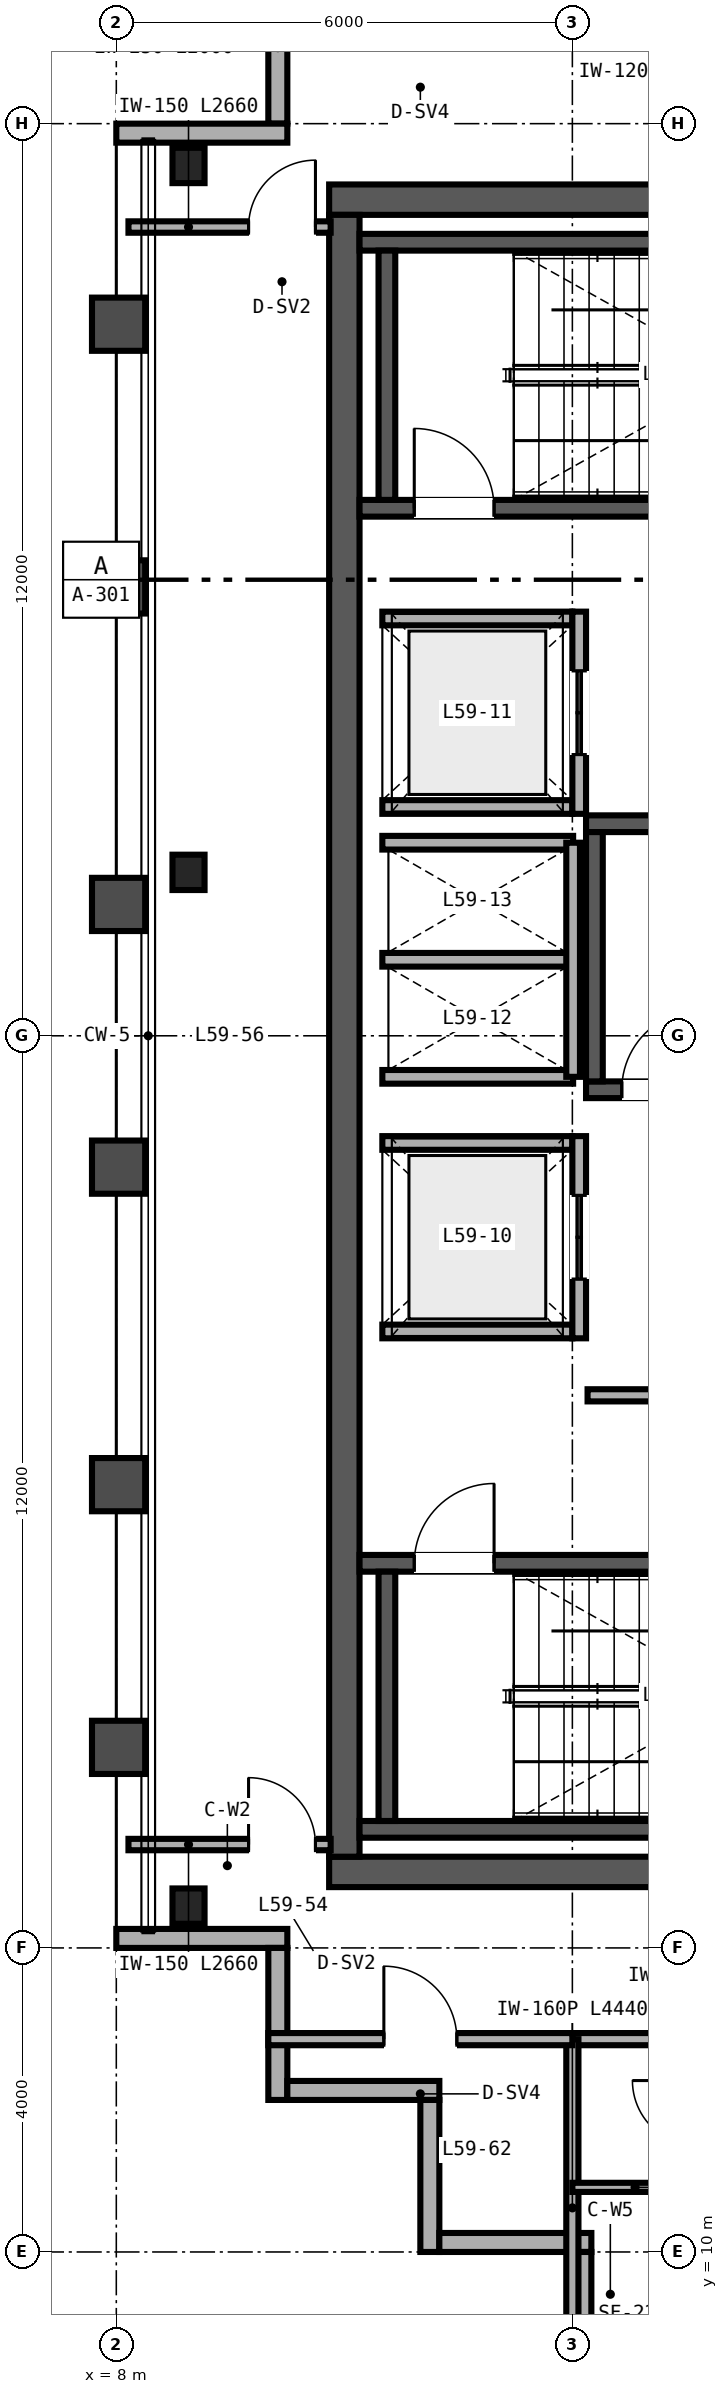
"""IFC4 building model, lengths in metres.
Left out: names, types, materials, properties, quantities, classifications, styles, units other than length and angle.
Written with IfcOpenShell. Run it as: python <this file> out.ifc"""

import sys

from ifc_helpers import new_model, si_unit, direction, frame, frame_2d, origin, origin_2d, place, context, subcontext, project, spatial, rectangle, i_section, extrude, source, transform, mapped, element, fill, save


model = new_model("IFC4")
c1 = context("Model", 3, precision=1e-05, world=origin(), true_north=direction((0.0, 1.0)))
c2 = subcontext(c1, "Body", "Model", "MODEL_VIEW")
j1 = project(units=[si_unit("LENGTHUNIT", "METRE"), si_unit("PLANEANGLEUNIT", "RADIAN")], contexts=[c1])
p1 = place(None, origin())
s1 = spatial("IfcSite", under=j1, at=p1, CompositionType="ELEMENT")
p2 = place(p1, origin())
s2 = spatial("IfcBuilding", under=s1, at=p2, CompositionType="ELEMENT")
p3 = place(p2, frame((0.0, 0.0, 236.4)))
s3 = spatial("IfcBuildingStorey", under=s2, at=p3, CompositionType="ELEMENT", Elevation=236.4)
p4 = place(p3, frame((10.8, 15.0, 0.0), z_axis=(0.0, 0.0, 1.0), x_axis=(1.0, 0.0, 0.0)))
e1 = element("IfcWall", 1, at=p4, inside=s3, PredefinedType="SHEAR", context=c2, shape_type="SweptSolid", body=[
    extrude(rectangle(XDim=12.4, YDim=0.4, at=frame_2d((6.2, 0.0))), origin(), (0.0, 0.0, 1.0), 3.38),
])
p5 = place(p4, frame((10.1, 0.0, 0.0)))
e2 = element("IfcOpeningElement", 2, at=p5, cuts=e1, PredefinedType="OPENING", context=c2, shape_type="SweptSolid", body=[
    extrude(rectangle(XDim=1.0, YDim=2.15, at=frame_2d((0.5, 1.075))), frame((0.0, 0.21, 0.0), z_axis=(0.0, -1.0, 0.0), x_axis=(1.0, 0.0, 0.0)), (0.0, 0.0, 1.0), 0.42),
])
p6 = place(p3, frame((10.8, 37.0, 0.0), z_axis=(0.0, 0.0, 1.0), x_axis=(1.0, 0.0, 0.0)))
e3 = element("IfcWall", 3, at=p6, inside=s3, PredefinedType="SHEAR", context=c2, shape_type="SweptSolid", body=[
    extrude(rectangle(XDim=12.4, YDim=0.4, at=frame_2d((6.2, 0.0))), origin(), (0.0, 0.0, 1.0), 3.38),
])
p7 = place(p6, frame((8.78, 0.0, 0.0)))
e4 = element("IfcOpeningElement", 4, at=p7, cuts=e3, PredefinedType="OPENING", context=c2, shape_type="SweptSolid", body=[
    extrude(rectangle(XDim=1.0, YDim=2.15, at=frame_2d((0.5, 1.075))), frame((0.0, 0.21, 0.0), z_axis=(0.0, -1.0, 0.0), x_axis=(1.0, 0.0, 0.0)), (0.0, 0.0, 1.0), 0.42),
])
p8 = place(p3, frame((11.0, 15.2, 0.0), z_axis=(0.0, 0.0, 1.0), x_axis=(0.0, 1.0, 0.0)))
e5 = element("IfcWall", 5, at=p8, inside=s3, PredefinedType="SHEAR", context=c2, shape_type="SweptSolid", body=[
    extrude(rectangle(XDim=21.6, YDim=0.4, at=frame_2d((10.8, 0.0))), origin(), (0.0, 0.0, 1.0), 3.38),
])
p9 = place(p3, frame((11.2, 15.56, 0.0), z_axis=(0.0, 0.0, 1.0), x_axis=(1.0, 0.0, 0.0)))
e6 = element("IfcWall", 6, at=p9, inside=s3, PredefinedType="SHEAR", context=c2, shape_type="SweptSolid", body=[
    extrude(rectangle(XDim=8.11, YDim=0.22, at=frame_2d((4.055, 0.0))), origin(), (0.0, 0.0, 1.0), 3.4),
])
p10 = place(p3, frame((11.2, 19.06, 0.0), z_axis=(0.0, 0.0, 1.0), x_axis=(1.0, 0.0, 0.0)))
e7 = element("IfcWall", 7, at=p10, inside=s3, PredefinedType="SHEAR", context=c2, shape_type="SweptSolid", body=[
    extrude(rectangle(XDim=8.11, YDim=0.22, at=frame_2d((4.055, 0.0))), origin(), (0.0, 0.0, 1.0), 3.4),
])
p11 = place(p10, frame((0.72, 0.0, 0.0)))
e8 = element("IfcOpeningElement", 8, at=p11, cuts=e7, PredefinedType="OPENING", context=c2, shape_type="SweptSolid", body=[
    extrude(rectangle(XDim=1.05, YDim=2.15, at=frame_2d((0.525, 1.075))), frame((0.0, 0.12, 0.0), z_axis=(0.0, -1.0, 0.0), x_axis=(1.0, 0.0, 0.0)), (0.0, 0.0, 1.0), 0.24),
])
p12 = place(p3, frame((11.56, 15.67, 0.0), z_axis=(0.0, 0.0, 1.0), x_axis=(0.0, 1.0, 0.0)))
e9 = element("IfcWall", 9, at=p12, inside=s3, PredefinedType="SHEAR", context=c2, shape_type="SweptSolid", body=[
    extrude(rectangle(XDim=3.28, YDim=0.22, at=frame_2d((1.64, 0.0))), origin(), (0.0, 0.0, 1.0), 3.4),
])
p13 = place(p3, frame((11.2, 32.94, 0.0), z_axis=(0.0, 0.0, 1.0), x_axis=(1.0, 0.0, 0.0)))
e10 = element("IfcWall", 10, at=p13, inside=s3, PredefinedType="SHEAR", context=c2, shape_type="SweptSolid", body=[
    extrude(rectangle(XDim=8.11, YDim=0.22, at=frame_2d((4.055, 0.0))), origin(), (0.0, 0.0, 1.0), 3.4),
])
p14 = place(p13, frame((0.72, 0.0, 0.0)))
e11 = element("IfcOpeningElement", 11, at=p14, cuts=e10, PredefinedType="OPENING", context=c2, shape_type="SweptSolid", body=[
    extrude(rectangle(XDim=1.05, YDim=2.15, at=frame_2d((0.525, 1.075))), frame((0.0, 0.12, 0.0), z_axis=(0.0, -1.0, 0.0), x_axis=(1.0, 0.0, 0.0)), (0.0, 0.0, 1.0), 0.24),
])
p15 = place(p3, frame((11.2, 36.44, 0.0), z_axis=(0.0, 0.0, 1.0), x_axis=(1.0, 0.0, 0.0)))
e12 = element("IfcWall", 12, at=p15, inside=s3, PredefinedType="SHEAR", context=c2, shape_type="SweptSolid", body=[
    extrude(rectangle(XDim=8.11, YDim=0.22, at=frame_2d((4.055, 0.0))), origin(), (0.0, 0.0, 1.0), 3.4),
])
p16 = place(p3, frame((11.56, 33.05, 0.0), z_axis=(0.0, 0.0, 1.0), x_axis=(0.0, 1.0, 0.0)))
e13 = element("IfcWall", 13, at=p16, inside=s3, PredefinedType="SHEAR", context=c2, shape_type="SweptSolid", body=[
    extrude(rectangle(XDim=3.28, YDim=0.22, at=frame_2d((1.64, 0.0))), origin(), (0.0, 0.0, 1.0), 3.4),
])
p17 = place(p3, frame((14.18, 25.29, 0.0), z_axis=(0.0, 0.0, 1.0), x_axis=(1.0, 0.0, 0.0)))
e14 = element("IfcWall", 14, at=p17, inside=s3, PredefinedType="SHEAR", context=c2, shape_type="SweptSolid", body=[
    extrude(rectangle(XDim=8.62, YDim=0.22, at=frame_2d((4.31, 0.0))), origin(), (0.0, 0.0, 1.0), 3.4),
])
p18 = place(p17, frame((0.47, 0.0, 0.0)))
e15 = element("IfcOpeningElement", 15, at=p18, cuts=e14, PredefinedType="OPENING", context=c2, shape_type="SweptSolid", body=[
    extrude(rectangle(XDim=1.05, YDim=2.15, at=frame_2d((0.525, 1.075))), frame((0.0, 0.12, 0.0), z_axis=(0.0, -1.0, 0.0), x_axis=(1.0, 0.0, 0.0)), (0.0, 0.0, 1.0), 0.24),
])
p19 = place(p3, frame((14.18, 28.79, 0.0), z_axis=(0.0, 0.0, 1.0), x_axis=(1.0, 0.0, 0.0)))
e16 = element("IfcWall", 16, at=p19, inside=s3, PredefinedType="SHEAR", context=c2, shape_type="SweptSolid", body=[
    extrude(rectangle(XDim=8.62, YDim=0.22, at=frame_2d((4.31, 0.0))), origin(), (0.0, 0.0, 1.0), 3.4),
])
p20 = place(p3, frame((14.29, 25.4, 0.0), z_axis=(0.0, 0.0, 1.0), x_axis=(0.0, 1.0, 0.0)))
e17 = element("IfcWall", 17, at=p20, inside=s3, PredefinedType="SHEAR", context=c2, shape_type="SweptSolid", body=[
    extrude(rectangle(XDim=3.28, YDim=0.22, at=frame_2d((1.64, 0.0))), origin(), (0.0, 0.0, 1.0), 3.4),
])
m1 = source(origin(), c2, "Body", "SweptSolid", [
    extrude(i_section(OverallWidth=0.422, OverallDepth=0.465, WebThickness=0.045, FlangeThickness=0.073, FilletRadius=0.025, at=origin_2d()), origin(), (0.0, 0.0, 1.0), 3.38),
])
for number, where, z_axis, x_axis in (
    (18, (8.95, 14.55, 0.0), (0.0, 0.0, 1.0), (1.0, 0.0, 0.0)),
    (19, (8.95, 28.15, 0.0), (0.0, 0.0, 1.0), (1.0, 0.0, 0.0)),
    (20, (8.95, 37.45, 0.0), (0.0, 0.0, 1.0), (1.0, 0.0, 0.0)),
):
    element("IfcColumn", number, at=place(p3, frame(where, z_axis=z_axis, x_axis=x_axis)), inside=s3, PredefinedType="COLUMN", context=c2, shape_type="MappedRepresentation", body=[
        mapped(m1, transform((0.0, 0.0, 0.0), scale=1.0)),
    ])
p21 = place(p3, frame((10.125, 40.0, 0.0), z_axis=(0.0, 0.0, 1.0), x_axis=(0.0, -1.0, 0.0)))
e21 = element("IfcWall", 21, at=p21, inside=s3, PredefinedType="SOLIDWALL", context=c2, shape_type="SweptSolid", body=[
    extrude(rectangle(XDim=2.0, YDim=0.25, at=frame_2d((1.0, 0.0))), origin(), (0.0, 0.0, 1.0), 3.38),
])
for number, where, z_axis, x_axis in (
    (22, (10.25, 37.875, 0.0), (0.0, 0.0, 1.0), (-1.0, 0.0, 0.0)),
    (23, (8.0, 14.125, 0.0), (0.0, 0.0, 1.0), (1.0, 0.0, 0.0)),
):
    element("IfcWall", number, at=place(p3, frame(where, z_axis=z_axis, x_axis=x_axis)), inside=s3, PredefinedType="SOLIDWALL", context=c2, shape_type="SweptSolid", body=[
        extrude(rectangle(XDim=2.25, YDim=0.25, at=frame_2d((1.125, 0.0))), origin(), (0.0, 0.0, 1.0), 3.38),
    ])
for number, where, z_axis, x_axis in (
    (24, (10.125, 14.0, 0.0), (0.0, 0.0, 1.0), (0.0, -1.0, 0.0)),
    (25, (10.25, 12.125, 0.0), (0.0, 0.0, 1.0), (1.0, 0.0, 0.0)),
    (26, (12.125, 12.0, 0.0), (0.0, 0.0, 1.0), (0.0, -1.0, 0.0)),
    (27, (12.25, 10.125, 0.0), (0.0, 0.0, 1.0), (1.0, 0.0, 0.0)),
):
    element("IfcWall", number, at=place(p3, frame(where, z_axis=z_axis, x_axis=x_axis)), inside=s3, PredefinedType="SOLIDWALL", context=c2, shape_type="SweptSolid", body=[
        extrude(rectangle(XDim=2.0, YDim=0.25, at=frame_2d((1.0, 0.0))), origin(), (0.0, 0.0, 1.0), 3.38),
    ])
p22 = place(p3, frame((14.125, 10.0, 0.0), z_axis=(0.0, 0.0, 1.0), x_axis=(0.0, -1.0, 0.0)))
e28 = element("IfcWall", 28, at=p22, inside=s3, PredefinedType="SOLIDWALL", context=c2, shape_type="SweptSolid", body=[
    extrude(rectangle(XDim=2.0, YDim=0.25, at=frame_2d((1.0, 0.0))), origin(), (0.0, 0.0, 1.0), 2.687),
])
for number, where, z_axis, x_axis in (
    (29, (11.5, 22.11, 0.0), (0.0, 0.0, 1.0), (1.0, 0.0, 0.0)),
    (30, (11.5, 24.59, 0.0), (0.0, 0.0, 1.0), (1.0, 0.0, 0.0)),
):
    element("IfcWall", number, at=place(p3, frame(where, z_axis=z_axis, x_axis=x_axis)), inside=s3, PredefinedType="SOLIDWALL", context=c2, shape_type="SweptSolid", body=[
        extrude(rectangle(XDim=2.5, YDim=0.18, at=frame_2d((1.25, 0.0))), origin(), (0.0, 0.0, 1.0), 3.38),
    ])
p23 = place(p3, frame((14.09, 22.02, 0.0), z_axis=(0.0, 0.0, 1.0), x_axis=(0.0, 1.0, 0.0)))
e31 = element("IfcWall", 31, at=p23, inside=s3, PredefinedType="SOLIDWALL", context=c2, shape_type="SweptSolid", body=[
    extrude(rectangle(XDim=2.66, YDim=0.18, at=frame_2d((1.33, 0.0))), origin(), (0.0, 0.0, 1.0), 3.38),
])
p24 = place(p23, frame((0.78, 0.0, 0.0)))
e32 = element("IfcOpeningElement", 32, at=p24, cuts=e31, PredefinedType="OPENING", context=c2, shape_type="SweptSolid", body=[
    extrude(rectangle(XDim=1.1, YDim=2.2, at=frame_2d((0.55, 1.1))), frame((0.0, 0.1, 0.0), z_axis=(0.0, -1.0, 0.0), x_axis=(1.0, 0.0, 0.0)), (0.0, 0.0, 1.0), 0.2),
])
for number, where, z_axis, x_axis in (
    (33, (11.5, 29.01, 0.0), (0.0, 0.0, 1.0), (1.0, 0.0, 0.0)),
    (34, (11.5, 31.49, 0.0), (0.0, 0.0, 1.0), (1.0, 0.0, 0.0)),
):
    element("IfcWall", number, at=place(p3, frame(where, z_axis=z_axis, x_axis=x_axis)), inside=s3, PredefinedType="SOLIDWALL", context=c2, shape_type="SweptSolid", body=[
        extrude(rectangle(XDim=2.5, YDim=0.18, at=frame_2d((1.25, 0.0))), origin(), (0.0, 0.0, 1.0), 3.38),
    ])
p25 = place(p3, frame((14.09, 28.92, 0.0), z_axis=(0.0, 0.0, 1.0), x_axis=(0.0, 1.0, 0.0)))
e35 = element("IfcWall", 35, at=p25, inside=s3, PredefinedType="SOLIDWALL", context=c2, shape_type="SweptSolid", body=[
    extrude(rectangle(XDim=2.66, YDim=0.18, at=frame_2d((1.33, 0.0))), origin(), (0.0, 0.0, 1.0), 3.38),
])
p26 = place(p25, frame((0.78, 0.0, 0.0)))
e36 = element("IfcOpeningElement", 36, at=p26, cuts=e35, PredefinedType="OPENING", context=c2, shape_type="SweptSolid", body=[
    extrude(rectangle(XDim=1.1, YDim=2.2, at=frame_2d((0.55, 1.1))), frame((0.0, 0.1, 0.0), z_axis=(0.0, -1.0, 0.0), x_axis=(1.0, 0.0, 0.0)), (0.0, 0.0, 1.0), 0.2),
])
for number, where, z_axis, x_axis in (
    (37, (11.5, 25.46, 0.0), (0.0, 0.0, 1.0), (1.0, 0.0, 0.0)),
    (38, (11.5, 27.0, 0.0), (0.0, 0.0, 1.0), (1.0, 0.0, 0.0)),
    (39, (11.5, 28.54, 0.0), (0.0, 0.0, 1.0), (1.0, 0.0, 0.0)),
):
    element("IfcWall", number, at=place(p3, frame(where, z_axis=z_axis, x_axis=x_axis)), inside=s3, PredefinedType="SOLIDWALL", context=c2, shape_type="SweptSolid", body=[
        extrude(rectangle(XDim=2.51, YDim=0.18, at=frame_2d((1.255, 0.0))), origin(), (0.0, 0.0, 1.0), 3.38),
    ])
p27 = place(p3, frame((14.01, 25.46, 0.0), z_axis=(0.0, 0.0, 1.0), x_axis=(0.0, 1.0, 0.0)))
e40 = element("IfcWall", 40, at=p27, inside=s3, PredefinedType="SOLIDWALL", context=c2, shape_type="SweptSolid", body=[
    extrude(rectangle(XDim=3.08, YDim=0.18, at=frame_2d((1.54, 0.0))), origin(), (0.0, 0.0, 1.0), 3.38),
])
p28 = place(p3, frame((14.2, 21.27, 0.0), z_axis=(0.0, 0.0, 1.0), x_axis=(1.0, 0.0, 0.0)))
e41 = element("IfcWall", 41, at=p28, inside=s3, PredefinedType="PARTITIONING", context=c2, shape_type="SweptSolid", body=[
    extrude(rectangle(XDim=4.58, YDim=0.16, at=frame_2d((2.29, 0.0))), origin(), (0.0, 0.0, 1.0), 3.38),
])
p29 = place(p28, frame((1.8, 0.0, 0.0)))
e42 = element("IfcOpeningElement", 42, at=p29, cuts=e41, PredefinedType="OPENING", context=c2, shape_type="SweptSolid", body=[
    extrude(rectangle(XDim=1.0, YDim=2.15, at=frame_2d((0.5, 1.075))), frame((0.0, 0.09, 0.0), z_axis=(0.0, -1.0, 0.0), x_axis=(1.0, 0.0, 0.0)), (0.0, 0.0, 1.0), 0.18),
])
p30 = place(p3, frame((14.0, 12.8, 0.0), z_axis=(0.0, 0.0, 1.0), x_axis=(1.0, 0.0, 0.0)))
e43 = element("IfcWall", 43, at=p30, inside=s3, PredefinedType="PARTITIONING", context=c2, shape_type="SweptSolid", body=[
    extrude(rectangle(XDim=12.0, YDim=0.16, at=frame_2d((6.0, 0.0))), origin(), (0.0, 0.0, 1.0), 2.923),
])
p31 = place(p30, frame((4.74, 0.0, 0.0)))
e44 = element("IfcOpeningElement", 44, at=p31, cuts=e43, PredefinedType="OPENING", context=c2, shape_type="SweptSolid", body=[
    extrude(rectangle(XDim=0.94, YDim=2.15, at=frame_2d((0.47, 1.075))), frame((0.0, 0.09, 0.0), z_axis=(0.0, -1.0, 0.0), x_axis=(1.0, 0.0, 0.0)), (0.0, 0.0, 1.0), 0.18),
])
p32 = place(p30, frame((10.74, 0.0, 0.0)))
e45 = element("IfcOpeningElement", 45, at=p32, cuts=e43, PredefinedType="OPENING", context=c2, shape_type="SweptSolid", body=[
    extrude(rectangle(XDim=0.94, YDim=2.15, at=frame_2d((0.47, 1.075))), frame((0.0, 0.09, 0.0), z_axis=(0.0, -1.0, 0.0), x_axis=(1.0, 0.0, 0.0)), (0.0, 0.0, 1.0), 0.18),
])
p33 = place(p3, frame((14.0, 8.36, 0.0), z_axis=(0.0, 0.0, 1.0), x_axis=(0.0, 1.0, 0.0)))
e46 = element("IfcWall", 46, at=p33, inside=s3, PredefinedType="PARTITIONING", context=c2, shape_type="SweptSolid", body=[
    extrude(rectangle(XDim=4.44, YDim=0.16, at=frame_2d((2.22, 0.0))), origin(), (0.0, 0.0, 1.0), 2.687),
])
p34 = place(p3, frame((14.0, 10.85, 0.0), z_axis=(0.0, 0.0, 1.0), x_axis=(1.0, 0.0, 0.0)))
e47 = element("IfcWall", 47, at=p34, inside=s3, PredefinedType="PARTITIONING", context=c2, shape_type="SweptSolid", body=[
    extrude(rectangle(XDim=1.65, YDim=0.12, at=frame_2d((0.825, 0.0))), origin(), (0.0, 0.0, 1.0), 3.38),
])
p35 = place(p3, frame((8.16, 15.36, 0.0), z_axis=(0.0, 0.0, 1.0), x_axis=(1.0, 0.0, 0.0)))
e48 = element("IfcWall", 48, at=p35, inside=s3, PredefinedType="PARTITIONING", context=c2, shape_type="SweptSolid", body=[
    extrude(rectangle(XDim=2.66, YDim=0.15, at=frame_2d((1.33, 0.0))), origin(), (0.0, 0.0, 1.0), 2.601),
])
p36 = place(p35, frame((1.58, 0.0, 0.0)))
e49 = element("IfcOpeningElement", 49, at=p36, cuts=e48, PredefinedType="OPENING", context=c2, shape_type="SweptSolid", body=[
    extrude(rectangle(XDim=0.88, YDim=2.15, at=frame_2d((0.44, 1.075))), frame((0.0, 0.085, 0.0), z_axis=(0.0, -1.0, 0.0), x_axis=(1.0, 0.0, 0.0)), (0.0, 0.0, 1.0), 0.17),
])
p37 = place(p3, frame((8.16, 36.64, 0.0), z_axis=(0.0, 0.0, 1.0), x_axis=(1.0, 0.0, 0.0)))
e50 = element("IfcWall", 50, at=p37, inside=s3, PredefinedType="PARTITIONING", context=c2, shape_type="SweptSolid", body=[
    extrude(rectangle(XDim=2.66, YDim=0.15, at=frame_2d((1.33, 0.0))), origin(), (0.0, 0.0, 1.0), 2.763),
])
p38 = place(p37, frame((1.58, 0.0, 0.0)))
e51 = element("IfcOpeningElement", 51, at=p38, cuts=e50, PredefinedType="OPENING", context=c2, shape_type="SweptSolid", body=[
    extrude(rectangle(XDim=0.88, YDim=2.15, at=frame_2d((0.44, 1.075))), frame((0.0, 0.085, 0.0), z_axis=(0.0, -1.0, 0.0), x_axis=(1.0, 0.0, 0.0)), (0.0, 0.0, 1.0), 0.17),
])
p39 = place(p3, frame((10.0, 12.8, 0.0), z_axis=(0.0, 0.0, 1.0), x_axis=(1.0, 0.0, 0.0)))
e52 = element("IfcWall", 52, at=p39, inside=s3, PredefinedType="PARTITIONING", context=c2, shape_type="SweptSolid", body=[
    extrude(rectangle(XDim=4.0, YDim=0.16, at=frame_2d((2.0, 0.0))), origin(), (0.0, 0.0, 1.0), 3.38),
])
p40 = place(p39, frame((1.52, 0.0, 0.0)))
e53 = element("IfcOpeningElement", 53, at=p40, cuts=e52, PredefinedType="OPENING", context=c2, shape_type="SweptSolid", body=[
    extrude(rectangle(XDim=0.96, YDim=2.15, at=frame_2d((0.48, 1.075))), frame((0.0, 0.09, 0.0), z_axis=(0.0, -1.0, 0.0), x_axis=(1.0, 0.0, 0.0)), (0.0, 0.0, 1.0), 0.18),
])
m2 = source(origin(), c2, "Body", "SweptSolid", [
    extrude(rectangle(XDim=1.05, YDim=2.15, at=frame_2d((0.525, 1.075))), frame((0.0, 0.025, 0.0), z_axis=(0.0, -1.0, 0.0), x_axis=(1.0, 0.0, 0.0)), (0.0, 0.0, 1.0), 0.05),
])
p41 = place(p11, origin())
e54 = element("IfcDoor", 54, at=p41, inside=s3, OperationType="SINGLE_SWING_RIGHT", PredefinedType="DOOR", context=c2, shape_type="MappedRepresentation", body=[
    mapped(m2, transform((0.0, 0.0, 0.0), scale=1.0)),
])
fill(e8, e54)
p42 = place(p14, origin())
e55 = element("IfcDoor", 55, at=p42, inside=s3, OperationType="SINGLE_SWING_LEFT", PredefinedType="DOOR", context=c2, shape_type="MappedRepresentation", body=[
    mapped(m2, transform((0.0, 0.0, 0.0), scale=1.0)),
])
fill(e11, e55)
p43 = place(p18, origin())
e56 = element("IfcDoor", 56, at=p43, inside=s3, OperationType="SINGLE_SWING_RIGHT", PredefinedType="DOOR", context=c2, shape_type="MappedRepresentation", body=[
    mapped(m2, transform((0.0, 0.0, 0.0), scale=1.0)),
])
fill(e15, e56)
m3 = source(origin(), c2, "Body", "SweptSolid", [
    extrude(rectangle(XDim=1.1, YDim=2.2, at=frame_2d((0.55, 1.1))), frame((0.0, 0.025, 0.0), z_axis=(0.0, -1.0, 0.0), x_axis=(1.0, 0.0, 0.0)), (0.0, 0.0, 1.0), 0.05),
])
p44 = place(p24, origin())
e57 = element("IfcDoor", 57, at=p44, inside=s3, OperationType="DOUBLE_DOOR_SLIDING", PredefinedType="DOOR", context=c2, shape_type="MappedRepresentation", body=[
    mapped(m3, transform((0.0, 0.0, 0.0), scale=1.0)),
])
fill(e32, e57)
p45 = place(p26, origin())
e58 = element("IfcDoor", 58, at=p45, inside=s3, OperationType="DOUBLE_DOOR_SLIDING", PredefinedType="DOOR", context=c2, shape_type="MappedRepresentation", body=[
    mapped(m3, transform((0.0, 0.0, 0.0), scale=1.0)),
])
fill(e36, e58)
m4 = source(origin(), c2, "Body", "SweptSolid", [
    extrude(rectangle(XDim=0.88, YDim=2.15, at=frame_2d((0.44, 1.075))), frame((0.0, 0.025, 0.0), z_axis=(0.0, -1.0, 0.0), x_axis=(1.0, 0.0, 0.0)), (0.0, 0.0, 1.0), 0.05),
])
p46 = place(p36, origin())
e59 = element("IfcDoor", 59, at=p46, inside=s3, OperationType="SINGLE_SWING_LEFT", PredefinedType="DOOR", context=c2, shape_type="MappedRepresentation", body=[
    mapped(m4, transform((0.0, 0.0, 0.0), scale=1.0)),
])
fill(e49, e59)
p47 = place(p38, origin())
e60 = element("IfcDoor", 60, at=p47, inside=s3, OperationType="SINGLE_SWING_RIGHT", PredefinedType="DOOR", context=c2, shape_type="MappedRepresentation", body=[
    mapped(m4, transform((0.0, 0.0, 0.0), scale=1.0)),
])
fill(e51, e60)
m5 = source(origin(), c2, "Body", "SweptSolid", [
    extrude(rectangle(XDim=0.96, YDim=2.15, at=frame_2d((0.48, 1.075))), frame((0.0, 0.025, 0.0), z_axis=(0.0, -1.0, 0.0), x_axis=(1.0, 0.0, 0.0)), (0.0, 0.0, 1.0), 0.05),
])
p48 = place(p40, origin())
e61 = element("IfcDoor", 61, at=p48, inside=s3, OperationType="SINGLE_SWING_LEFT", PredefinedType="DOOR", context=c2, shape_type="MappedRepresentation", body=[
    mapped(m5, transform((0.0, 0.0, 0.0), scale=1.0)),
])
fill(e53, e61)
save(model, sys.argv[1])
